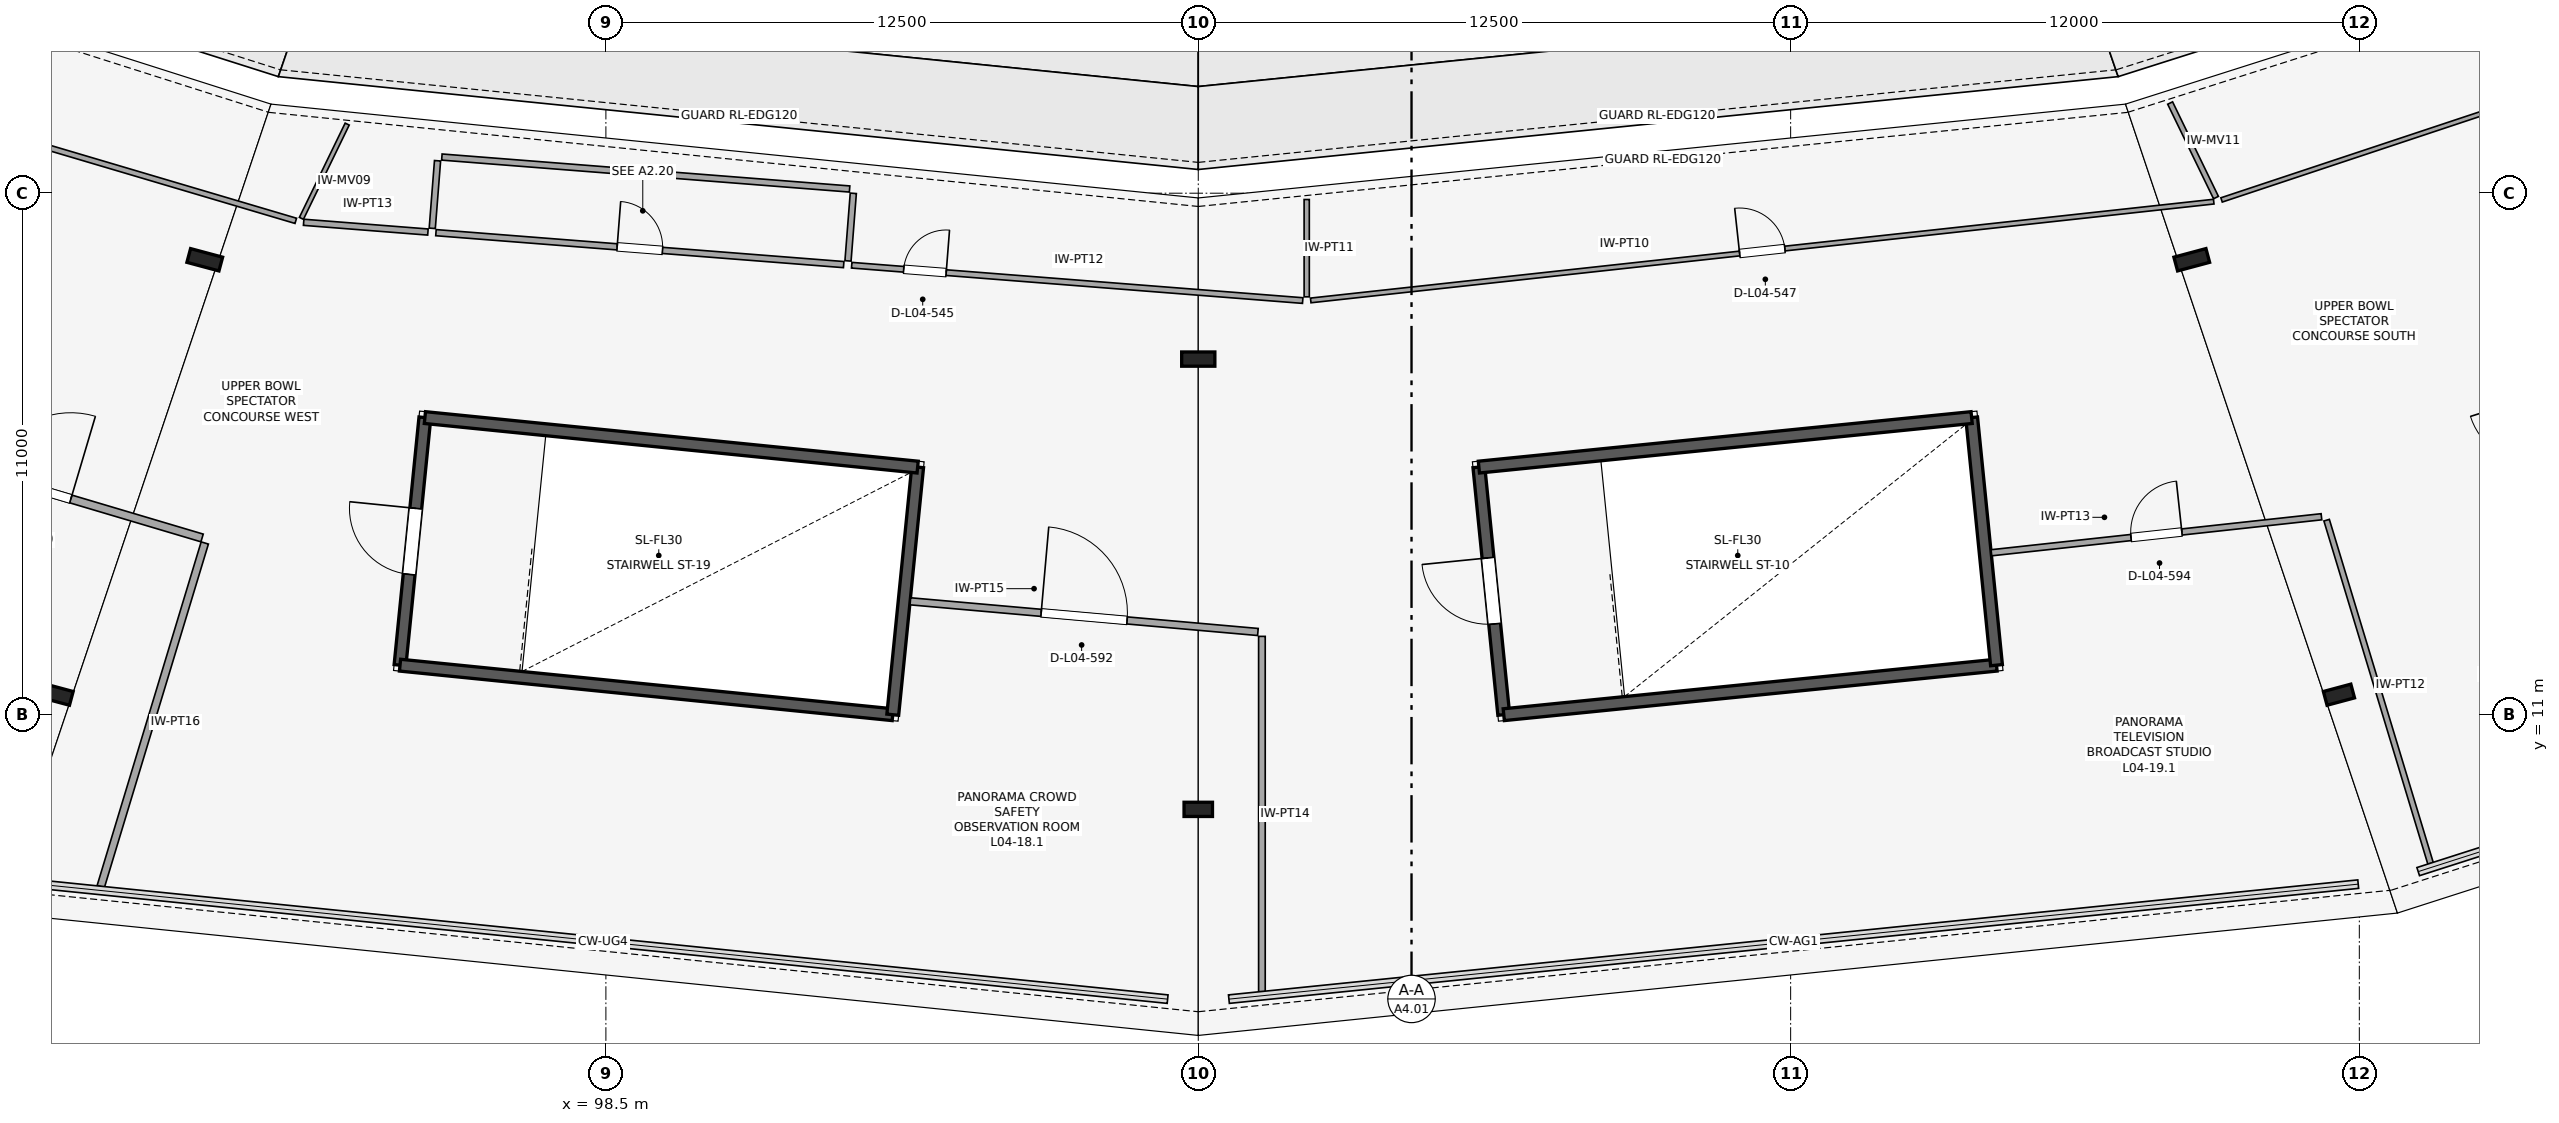
"""IFC4 building model, lengths in metres.
Left out: names, types, materials, properties, quantities, classifications, styles, units other than length and angle.
Written with IfcOpenShell. Run it as: python <this file> out.ifc"""

import sys

from ifc_helpers import new_model, si_unit, direction, frame, frame_2d, origin, origin_2d, place, context, subcontext, project, spatial, rectangle, i_section, extrude, element, fill, save


model = new_model("IFC4")
c1 = context("Model", 3, precision=1e-05, world=origin(), true_north=direction((0.0, 1.0)))
c2 = subcontext(c1, "Body", "Model", "MODEL_VIEW")
j1 = project(units=[si_unit("LENGTHUNIT", "METRE"), si_unit("PLANEANGLEUNIT", "RADIAN")], contexts=[c1])
p1 = place(None, origin())
s1 = spatial("IfcSite", under=j1, at=p1, CompositionType="ELEMENT")
p2 = place(p1, origin())
s2 = spatial("IfcBuilding", under=s1, at=p2, CompositionType="ELEMENT")
p3 = place(p2, frame((0.0, 0.0, 20.8)))
s3 = spatial("IfcBuildingStorey", under=s2, at=p3, CompositionType="ELEMENT", Elevation=20.8)
for number, where, z_axis, x_axis in (
    (1, (90.036, 20.596, 0.0), (0.0, 0.0, 1.0), (-0.259, -0.966, 0.0)),
    (2, (111.0, 18.5, 0.0), (0.0, 0.0, 1.0), (0.0, -1.0, 0.0)),
    (3, (131.964, 20.596, 0.0), (0.0, 0.0, 1.0), (0.259, -0.966, 0.0)),
):
    element("IfcColumn", number, at=place(p3, frame(where, z_axis=z_axis, x_axis=x_axis)), inside=s3, PredefinedType="COLUMN", context=c2, shape_type="SweptSolid", body=[
        extrude(i_section(OverallWidth=0.3, OverallDepth=0.7, WebThickness=0.017, FlangeThickness=0.032, FilletRadius=0.027, at=origin_2d()), origin(), (0.0, 0.0, 1.0), 5.4),
    ])
for number, where, z_axis, x_axis in (
    (4, (86.93, 11.419, 0.0), (0.0, 0.0, 1.0), (-0.259, -0.966, 0.0)),
    (5, (111.0, 9.0, 0.0), (0.0, 0.0, 1.0), (0.0, -1.0, 0.0)),
    (6, (135.07, 11.419, 0.0), (0.0, 0.0, 1.0), (0.259, -0.966, 0.0)),
):
    element("IfcColumn", number, at=place(p3, frame(where, z_axis=z_axis, x_axis=x_axis)), inside=s3, PredefinedType="COLUMN", context=c2, shape_type="SweptSolid", body=[
        extrude(i_section(OverallWidth=0.3, OverallDepth=0.6, WebThickness=0.015, FlangeThickness=0.03, FilletRadius=0.027, at=origin_2d()), origin(), (0.0, 0.0, 1.0), 5.4),
    ])
p4 = place(p3, frame((116.921, 16.221, 0.0), z_axis=(0.0, 0.0, 1.0), x_axis=(0.100028593886, -0.994984562898, 0.0)))
e7 = element("IfcWall", 7, at=p4, inside=s3, PredefinedType="SHEAR", context=c2, shape_type="SweptSolid", body=[
    extrude(rectangle(XDim=5.25, YDim=0.25, at=frame_2d((2.625, 0.0))), origin(), (0.0, 0.0, 1.0), 3.2),
])
p5 = place(p4, frame((1.925, 0.0, 0.0)))
e8 = element("IfcOpeningElement", 8, at=p5, cuts=e7, PredefinedType="OPENING", context=c2, shape_type="SweptSolid", body=[
    extrude(rectangle(XDim=1.4, YDim=2.2, at=frame_2d((0.7, 1.1))), frame((0.0, 0.135, 0.0), z_axis=(0.0, -1.0, 0.0), x_axis=(1.0, 0.0, 0.0)), (0.0, 0.0, 1.0), 0.27),
])
p6 = place(p3, frame((117.447, 10.997, 0.0), z_axis=(0.0, 0.0, 1.0), x_axis=(0.994985938948, 0.100014905366, 0.0)))
e9 = element("IfcWall", 9, at=p6, inside=s3, PredefinedType="SHEAR", context=c2, shape_type="SweptSolid", body=[
    extrude(rectangle(XDim=10.45, YDim=0.25, at=frame_2d((5.225, 0.0))), origin(), (0.0, 0.0, 1.0), 3.2),
])
p7 = place(p3, frame((127.844, 12.042, 0.0), z_axis=(0.0, 0.0, 1.0), x_axis=(-0.100028593886, 0.994984562898, 0.0)))
e10 = element("IfcWall", 10, at=p7, inside=s3, PredefinedType="SHEAR", context=c2, shape_type="SweptSolid", body=[
    extrude(rectangle(XDim=5.25, YDim=0.25, at=frame_2d((2.625, 0.0))), origin(), (0.0, 0.0, 1.0), 3.2),
])
p8 = place(p3, frame((127.319, 17.266, 0.0), z_axis=(0.0, 0.0, 1.0), x_axis=(-0.994985938948, -0.100014905366, 0.0)))
e11 = element("IfcWall", 11, at=p8, inside=s3, PredefinedType="SHEAR", context=c2, shape_type="SweptSolid", body=[
    extrude(rectangle(XDim=10.45, YDim=0.25, at=frame_2d((5.225, 0.0))), origin(), (0.0, 0.0, 1.0), 3.2),
])
p9 = place(p3, frame((94.681, 17.266, 0.0), z_axis=(0.0, 0.0, 1.0), x_axis=(-0.10002396577, -0.994985028165, 0.0)))
e12 = element("IfcWall", 12, at=p9, inside=s3, PredefinedType="SHEAR", context=c2, shape_type="SweptSolid", body=[
    extrude(rectangle(XDim=5.25, YDim=0.25, at=frame_2d((2.625, 0.0))), origin(), (0.0, 0.0, 1.0), 3.2),
])
p10 = place(p9, frame((1.925, 0.0, 0.0)))
e13 = element("IfcOpeningElement", 13, at=p10, cuts=e12, PredefinedType="OPENING", context=c2, shape_type="SweptSolid", body=[
    extrude(rectangle(XDim=1.4, YDim=2.2, at=frame_2d((0.7, 1.1))), frame((0.0, 0.135, 0.0), z_axis=(0.0, -1.0, 0.0), x_axis=(1.0, 0.0, 0.0)), (0.0, 0.0, 1.0), 0.27),
])
p11 = place(p3, frame((94.156, 12.042, 0.0), z_axis=(0.0, 0.0, 1.0), x_axis=(0.994988263568, -0.09999177647, 0.0)))
e14 = element("IfcWall", 14, at=p11, inside=s3, PredefinedType="SHEAR", context=c2, shape_type="SweptSolid", body=[
    extrude(rectangle(XDim=10.45, YDim=0.25, at=frame_2d((5.225, 0.0))), origin(), (0.0, 0.0, 1.0), 3.2),
])
p12 = place(p3, frame((104.553, 10.997, 0.0), z_axis=(0.0, 0.0, 1.0), x_axis=(0.099982555566, 0.994989190184, 0.0)))
e15 = element("IfcWall", 15, at=p12, inside=s3, PredefinedType="SHEAR", context=c2, shape_type="SweptSolid", body=[
    extrude(rectangle(XDim=5.25, YDim=0.25, at=frame_2d((2.625, 0.0))), origin(), (0.0, 0.0, 1.0), 3.2),
])
p13 = place(p3, frame((105.078, 16.221, 0.0), z_axis=(0.0, 0.0, 1.0), x_axis=(-0.994985705245, 0.100017230303, 0.0)))
e16 = element("IfcWall", 16, at=p13, inside=s3, PredefinedType="SHEAR", context=c2, shape_type="SweptSolid", body=[
    extrude(rectangle(XDim=10.45, YDim=0.25, at=frame_2d((5.225, 0.0))), origin(), (0.0, 0.0, 1.0), 3.2),
])
p14 = place(p3, frame((71.992, 27.327, 0.0), z_axis=(0.0, 0.0, 1.0), x_axis=(0.958867523935, -0.283853961648, 0.0)))
e17 = element("IfcWall", 17, at=p14, inside=s3, PredefinedType="MOVABLE", context=c2, shape_type="SweptSolid", body=[
    extrude(rectangle(XDim=20.82, YDim=0.115, at=frame_2d((10.41, 0.0))), origin(), (0.0, 0.0, 1.0), 3.89),
])
p15 = place(p14, frame((9.5, 0.0, 0.0)))
e18 = element("IfcOpeningElement", 18, at=p15, cuts=e17, PredefinedType="OPENING", context=c2, shape_type="SweptSolid", body=[
    extrude(rectangle(XDim=1.82, YDim=2.1, at=frame_2d((0.91, 1.05))), frame((0.0, 0.067, 0.0), z_axis=(0.0, -1.0, 0.0), x_axis=(1.0, 0.0, 0.0)), (0.0, 0.0, 1.0), 0.135),
])
p16 = place(p3, frame((93.041, 23.458, 0.0), z_axis=(0.0, 0.0, 1.0), x_axis=(-0.436937147181, -0.899492039661, 0.0)))
e19 = element("IfcWall", 19, at=p16, inside=s3, PredefinedType="MOVABLE", context=c2, shape_type="SweptSolid", body=[
    extrude(rectangle(XDim=2.211, YDim=0.095, at=frame_2d((1.105, 0.0))), origin(), (0.0, 0.0, 1.0), 3.89),
])
p17 = place(p3, frame((94.914, 21.167, 0.0), z_axis=(0.0, 0.0, 1.0), x_axis=(0.99694701985, -0.078080981123, 0.0)))
e20 = element("IfcWall", 20, at=p17, inside=s3, PredefinedType="PARTITIONING", context=c2, shape_type="SweptSolid", body=[
    extrude(rectangle(XDim=8.63, YDim=0.13, at=frame_2d((4.315, 0.0))), origin(), (0.0, 0.0, 1.0), 3.89),
])
p18 = place(p17, frame((3.835, 0.0, 0.0)))
e21 = element("IfcOpeningElement", 21, at=p18, cuts=e20, PredefinedType="OPENING", context=c2, shape_type="SweptSolid", body=[
    extrude(rectangle(XDim=0.96, YDim=2.24, at=frame_2d((0.48, 1.12))), frame((0.0, 0.075, 0.0), z_axis=(0.0, -1.0, 0.0), x_axis=(1.0, 0.0, 0.0)), (0.0, 0.0, 1.0), 0.15),
])
p19 = place(p3, frame((95.039, 22.763, 0.0), z_axis=(0.0, 0.0, 1.0), x_axis=(0.996944989866, -0.078106895861, 0.0)))
e22 = element("IfcWall", 22, at=p19, inside=s3, PredefinedType="PARTITIONING", context=c2, shape_type="SweptSolid", body=[
    extrude(rectangle(XDim=8.63, YDim=0.13, at=frame_2d((4.315, 0.0))), origin(), (0.0, 0.0, 1.0), 3.89),
])
p20 = place(p3, frame((94.836, 21.259, 0.0), z_axis=(0.0, 0.0, 1.0), x_axis=(0.07801492319, 0.996952191311, 0.0)))
e23 = element("IfcWall", 23, at=p20, inside=s3, PredefinedType="PARTITIONING", context=c2, shape_type="SweptSolid", body=[
    extrude(rectangle(XDim=1.43, YDim=0.13, at=frame_2d((0.715, 0.0))), origin(), (0.0, 0.0, 1.0), 3.89),
])
p21 = place(p3, frame((103.609, 20.572, 0.0), z_axis=(0.0, 0.0, 1.0), x_axis=(0.07819789998, 0.996937855856, 0.0)))
e24 = element("IfcWall", 24, at=p21, inside=s3, PredefinedType="PARTITIONING", context=c2, shape_type="SweptSolid", body=[
    extrude(rectangle(XDim=1.43, YDim=0.13, at=frame_2d((0.715, 0.0))), origin(), (0.0, 0.0, 1.0), 3.89),
])
p22 = place(p3, frame((92.123, 21.386, 0.0), z_axis=(0.0, 0.0, 1.0), x_axis=(0.996948159795, -0.078066424803, 0.0)))
e25 = element("IfcWall", 25, at=p22, inside=s3, PredefinedType="PARTITIONING", context=c2, shape_type="SweptSolid", body=[
    extrude(rectangle(XDim=2.63, YDim=0.13, at=frame_2d((1.315, 0.0))), origin(), (0.0, 0.0, 1.0), 3.89),
])
p23 = place(p3, frame((103.687, 20.48, 0.0), z_axis=(0.0, 0.0, 1.0), x_axis=(0.996947010811, -0.078081096534, 0.0)))
e26 = element("IfcWall", 26, at=p23, inside=s3, PredefinedType="PARTITIONING", context=c2, shape_type="SweptSolid", body=[
    extrude(rectangle(XDim=9.546, YDim=0.12, at=frame_2d((4.773, 0.0))), origin(), (0.0, 0.0, 1.0), 3.89),
])
p24 = place(p23, frame((1.1, 0.0, 0.0)))
e27 = element("IfcOpeningElement", 27, at=p24, cuts=e26, PredefinedType="OPENING", context=c2, shape_type="SweptSolid", body=[
    extrude(rectangle(XDim=0.9, YDim=2.1, at=frame_2d((0.45, 1.05))), frame((0.0, 0.07, 0.0), z_axis=(0.0, -1.0, 0.0), x_axis=(1.0, 0.0, 0.0)), (0.0, 0.0, 1.0), 0.14),
])
p25 = place(p3, frame((113.288, 21.867, 0.0), z_axis=(0.0, 0.0, 1.0), x_axis=(0.000118906063, -0.999999992931, 0.0)))
e28 = element("IfcWall", 28, at=p25, inside=s3, PredefinedType="PARTITIONING", context=c2, shape_type="SweptSolid", body=[
    extrude(rectangle(XDim=2.053, YDim=0.11, at=frame_2d((1.027, 0.0))), origin(), (0.0, 0.0, 1.0), 3.89),
])
p26 = place(p3, frame((113.373, 19.738, 0.0), z_axis=(0.0, 0.0, 1.0), x_axis=(0.994069777287, 0.108744093563, 0.0)))
e29 = element("IfcWall", 29, at=p26, inside=s3, PredefinedType="PARTITIONING", context=c2, shape_type="SweptSolid", body=[
    extrude(rectangle(XDim=19.169, YDim=0.1, at=frame_2d((9.584, 0.0))), origin(), (0.0, 0.0, 1.0), 3.89),
])
p27 = place(p26, frame((9.104, 0.0, 0.0)))
e30 = element("IfcOpeningElement", 30, at=p27, cuts=e29, PredefinedType="OPENING", context=c2, shape_type="SweptSolid", body=[
    extrude(rectangle(XDim=0.96, YDim=2.24, at=frame_2d((0.48, 1.12))), frame((0.0, 0.06, 0.0), z_axis=(0.0, -1.0, 0.0), x_axis=(1.0, 0.0, 0.0)), (0.0, 0.0, 1.0), 0.12),
])
p28 = place(p3, frame((131.508, 23.903, 0.0), z_axis=(0.0, 0.0, 1.0), x_axis=(0.436389677302, -0.899757772706, 0.0)))
e31 = element("IfcWall", 31, at=p28, inside=s3, PredefinedType="MOVABLE", context=c2, shape_type="SweptSolid", body=[
    extrude(rectangle(XDim=2.217, YDim=0.115, at=frame_2d((1.108, 0.0))), origin(), (0.0, 0.0, 1.0), 3.89),
])
p29 = place(p3, frame((132.593, 21.858, 0.0), z_axis=(0.0, 0.0, 1.0), x_axis=(0.948998991107, 0.315279106314, 0.0)))
e32 = element("IfcWall", 32, at=p29, inside=s3, PredefinedType="MOVABLE", context=c2, shape_type="SweptSolid", body=[
    extrude(rectangle(XDim=20.617, YDim=0.095, at=frame_2d((10.309, 0.0))), origin(), (0.0, 0.0, 1.0), 3.89),
])
p30 = place(p29, frame((9.799, 0.0, 0.0)))
e33 = element("IfcOpeningElement", 33, at=p30, cuts=e32, PredefinedType="OPENING", context=c2, shape_type="SweptSolid", body=[
    extrude(rectangle(XDim=1.02, YDim=2.1, at=frame_2d((0.51, 1.05))), frame((0.0, 0.057, 0.0), z_axis=(0.0, -1.0, 0.0), x_axis=(1.0, 0.0, 0.0)), (0.0, 0.0, 1.0), 0.115),
])
p31 = place(p3, frame((82.696, 16.89, 0.0), z_axis=(0.0, 0.0, 1.0), x_axis=(0.958592326315, -0.284781937506, 0.0)))
e34 = element("IfcWall", 34, at=p31, inside=s3, PredefinedType="PARTITIONING", context=c2, shape_type="SweptSolid", body=[
    extrude(rectangle(XDim=7.597, YDim=0.17, at=frame_2d((3.799, 0.0))), origin(), (0.0, 0.0, 1.0), 3.89),
])
p32 = place(p31, frame((2.889, 0.0, 0.0)))
e35 = element("IfcOpeningElement", 35, at=p32, cuts=e34, PredefinedType="OPENING", context=c2, shape_type="SweptSolid", body=[
    extrude(rectangle(XDim=1.82, YDim=2.24, at=frame_2d((0.91, 1.12))), frame((0.0, 0.095, 0.0), z_axis=(0.0, -1.0, 0.0), x_axis=(1.0, 0.0, 0.0)), (0.0, 0.0, 1.0), 0.19),
])
p33 = place(p3, frame((90.036, 14.62, 0.0), z_axis=(0.0, 0.0, 1.0), x_axis=(-0.289819492938, -0.957081324399, 0.0)))
e36 = element("IfcWall", 36, at=p33, inside=s3, PredefinedType="PARTITIONING", context=c2, shape_type="SweptSolid", body=[
    extrude(rectangle(XDim=7.573, YDim=0.16, at=frame_2d((3.787, 0.0))), origin(), (0.0, 0.0, 1.0), 3.89),
])
p34 = place(p3, frame((104.925, 13.39, 0.0), z_axis=(0.0, 0.0, 1.0), x_axis=(0.996125750198, -0.087940262634, 0.0)))
e37 = element("IfcWall", 37, at=p34, inside=s3, PredefinedType="PARTITIONING", context=c2, shape_type="SweptSolid", body=[
    extrude(rectangle(XDim=7.363, YDim=0.15, at=frame_2d((3.681, 0.0))), origin(), (0.0, 0.0, 1.0), 3.89),
])
p35 = place(p34, frame((2.771, 0.0, 0.0)))
e38 = element("IfcOpeningElement", 38, at=p35, cuts=e37, PredefinedType="OPENING", context=c2, shape_type="SweptSolid", body=[
    extrude(rectangle(XDim=1.82, YDim=2.38, at=frame_2d((0.91, 1.19))), frame((0.0, 0.085, 0.0), z_axis=(0.0, -1.0, 0.0), x_axis=(1.0, 0.0, 0.0)), (0.0, 0.0, 1.0), 0.17),
])
p36 = place(p3, frame((112.343, 12.65, 0.0), z_axis=(0.0, 0.0, 1.0), x_axis=(-3.2561623e-05, -0.99999999947, 0.0)))
e39 = element("IfcWall", 39, at=p36, inside=s3, PredefinedType="PARTITIONING", context=c2, shape_type="SweptSolid", body=[
    extrude(rectangle(XDim=7.498, YDim=0.14, at=frame_2d((3.749, 0.0))), origin(), (0.0, 0.0, 1.0), 3.89),
])
p37 = place(p3, frame((127.737, 14.414, 0.0), z_axis=(0.0, 0.0, 1.0), x_axis=(0.994101903369, 0.108450014839, 0.0)))
e40 = element("IfcWall", 40, at=p37, inside=s3, PredefinedType="PARTITIONING", context=c2, shape_type="SweptSolid", body=[
    extrude(rectangle(XDim=7.006, YDim=0.13, at=frame_2d((3.503, 0.0))), origin(), (0.0, 0.0, 1.0), 3.89),
])
p38 = place(p37, frame((2.963, 0.0, 0.0)))
e41 = element("IfcOpeningElement", 41, at=p38, cuts=e40, PredefinedType="OPENING", context=c2, shape_type="SweptSolid", body=[
    extrude(rectangle(XDim=1.08, YDim=2.24, at=frame_2d((0.54, 1.12))), frame((0.0, 0.075, 0.0), z_axis=(0.0, -1.0, 0.0), x_axis=(1.0, 0.0, 0.0)), (0.0, 0.0, 1.0), 0.15),
])
p39 = place(p3, frame((134.81, 15.101, 0.0), z_axis=(0.0, 0.0, 1.0), x_axis=(0.289904410336, -0.957055605943, 0.0)))
e42 = element("IfcWall", 42, at=p39, inside=s3, PredefinedType="PARTITIONING", context=c2, shape_type="SweptSolid", body=[
    extrude(rectangle(XDim=7.567, YDim=0.12, at=frame_2d((3.783, 0.0))), origin(), (0.0, 0.0, 1.0), 3.89),
])
p40 = place(p5, frame((1.4, 0.0, 0.0), z_axis=(0.0, 0.0, 1.0), x_axis=(-1.0, 0.0, 0.0)))
e43 = element("IfcDoor", 43, at=p40, inside=s3, OperationType="SINGLE_SWING_RIGHT", PredefinedType="DOOR", context=c2, shape_type="SweptSolid", body=[
    extrude(rectangle(XDim=1.4, YDim=2.2, at=frame_2d((0.7, 1.1))), frame((0.0, 0.025, 0.0), z_axis=(0.0, -1.0, 0.0), x_axis=(1.0, 0.0, 0.0)), (0.0, 0.0, 1.0), 0.05),
])
fill(e8, e43)
p41 = place(p10, frame((1.4, 0.0, 0.0), z_axis=(0.0, 0.0, 1.0), x_axis=(-1.0, 0.0, 0.0)))
e44 = element("IfcDoor", 44, at=p41, inside=s3, OperationType="SINGLE_SWING_RIGHT", PredefinedType="DOOR", context=c2, shape_type="SweptSolid", body=[
    extrude(rectangle(XDim=1.4, YDim=2.2, at=frame_2d((0.7, 1.1))), frame((0.0, 0.025, 0.0), z_axis=(0.0, -1.0, 0.0), x_axis=(1.0, 0.0, 0.0)), (0.0, 0.0, 1.0), 0.05),
])
fill(e13, e44)
p42 = place(p18, origin())
e45 = element("IfcDoor", 45, at=p42, inside=s3, OperationType="SINGLE_SWING_LEFT", PredefinedType="DOOR", context=c2, shape_type="SweptSolid", body=[
    extrude(rectangle(XDim=0.96, YDim=2.24, at=frame_2d((0.48, 1.12))), frame((0.0, 0.025, 0.0), z_axis=(0.0, -1.0, 0.0), x_axis=(1.0, 0.0, 0.0)), (0.0, 0.0, 1.0), 0.05),
])
fill(e21, e45)
p43 = place(p24, origin())
e46 = element("IfcDoor", 46, at=p43, inside=s3, OperationType="SINGLE_SWING_RIGHT", PredefinedType="DOOR", context=c2, shape_type="SweptSolid", body=[
    extrude(rectangle(XDim=0.9, YDim=2.1, at=frame_2d((0.45, 1.05))), frame((0.0, 0.025, 0.0), z_axis=(0.0, -1.0, 0.0), x_axis=(1.0, 0.0, 0.0)), (0.0, 0.0, 1.0), 0.05),
])
fill(e27, e46)
p44 = place(p27, origin())
e47 = element("IfcDoor", 47, at=p44, inside=s3, OperationType="SINGLE_SWING_LEFT", PredefinedType="DOOR", context=c2, shape_type="SweptSolid", body=[
    extrude(rectangle(XDim=0.96, YDim=2.24, at=frame_2d((0.48, 1.12))), frame((0.0, 0.025, 0.0), z_axis=(0.0, -1.0, 0.0), x_axis=(1.0, 0.0, 0.0)), (0.0, 0.0, 1.0), 0.05),
])
fill(e30, e47)
p45 = place(p32, origin())
e48 = element("IfcDoor", 48, at=p45, inside=s3, OperationType="SINGLE_SWING_RIGHT", PredefinedType="DOOR", context=c2, shape_type="SweptSolid", body=[
    extrude(rectangle(XDim=1.82, YDim=2.24, at=frame_2d((0.91, 1.12))), frame((0.0, 0.025, 0.0), z_axis=(0.0, -1.0, 0.0), x_axis=(1.0, 0.0, 0.0)), (0.0, 0.0, 1.0), 0.05),
])
fill(e35, e48)
p46 = place(p35, origin())
e49 = element("IfcDoor", 49, at=p46, inside=s3, OperationType="SINGLE_SWING_LEFT", PredefinedType="DOOR", context=c2, shape_type="SweptSolid", body=[
    extrude(rectangle(XDim=1.82, YDim=2.38, at=frame_2d((0.91, 1.19))), frame((0.0, 0.025, 0.0), z_axis=(0.0, -1.0, 0.0), x_axis=(1.0, 0.0, 0.0)), (0.0, 0.0, 1.0), 0.05),
])
fill(e38, e49)
p47 = place(p38, origin())
e50 = element("IfcDoor", 50, at=p47, inside=s3, OperationType="SINGLE_SWING_RIGHT", PredefinedType="DOOR", context=c2, shape_type="SweptSolid", body=[
    extrude(rectangle(XDim=1.08, YDim=2.24, at=frame_2d((0.54, 1.12))), frame((0.0, 0.025, 0.0), z_axis=(0.0, -1.0, 0.0), x_axis=(1.0, 0.0, 0.0)), (0.0, 0.0, 1.0), 0.05),
])
fill(e41, e50)
save(model, sys.argv[1])
